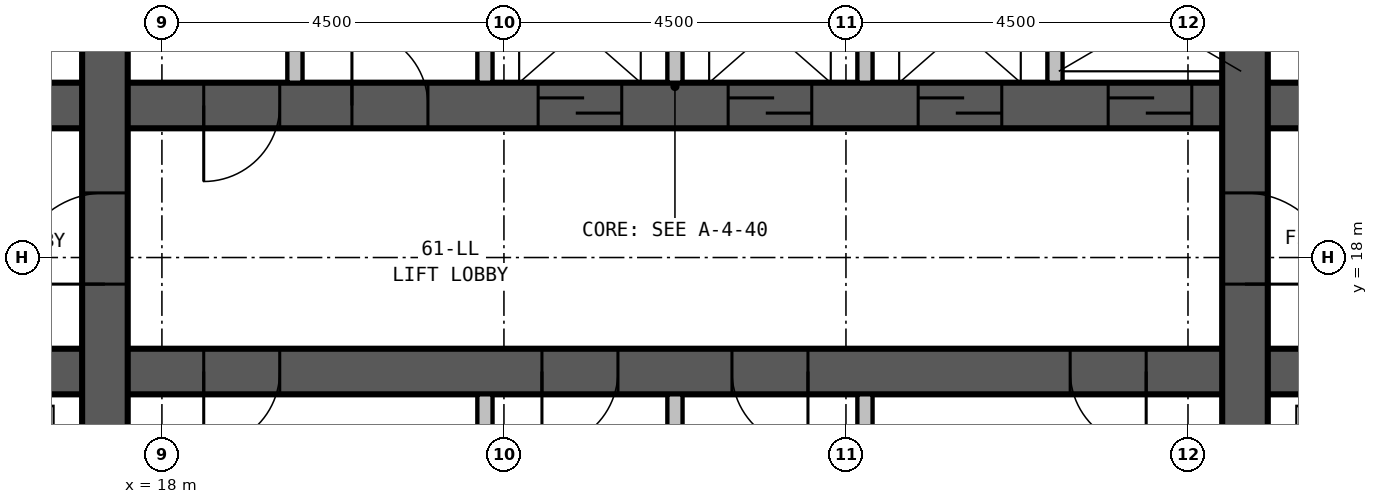
"""IFC4 building model, lengths in metres.
Left out: names, types, materials, properties, quantities, classifications, styles, units other than length and angle.
Written with IfcOpenShell. Run it as: python <this file> out.ifc"""

import sys

from ifc_helpers import new_model, si_unit, direction, frame, frame_2d, origin, place, context, subcontext, project, spatial, rectangle, extrude, element, fill, save


model = new_model("IFC4")
c1 = context("Model", 3, precision=1e-05, world=origin(), true_north=direction((0.0, 1.0)))
c2 = subcontext(c1, "Body", "Model", "MODEL_VIEW")
j1 = project(units=[si_unit("LENGTHUNIT", "METRE"), si_unit("PLANEANGLEUNIT", "RADIAN")], contexts=[c1])
p1 = place(None, origin())
s1 = spatial("IfcSite", under=j1, at=p1, CompositionType="ELEMENT")
p2 = place(p1, origin())
s2 = spatial("IfcBuilding", under=s1, at=p2, CompositionType="ELEMENT")
p3 = place(p2, frame((0.0, 0.0, 236.9)))
s3 = spatial("IfcBuildingStorey", under=s2, at=p3, CompositionType="ELEMENT", Elevation=236.9)
p4 = place(p3, frame((17.25, 13.8, 0.0), z_axis=(0.0, 0.0, 1.0), x_axis=(0.0, 1.0, 0.0)))
e1 = element("IfcWall", 1, at=p4, inside=s3, PredefinedType="SHEAR", context=c2, shape_type="SweptSolid", body=[
    extrude(rectangle(XDim=12.9, YDim=0.6, at=frame_2d((6.45, 0.0))), origin(), (0.0, 0.0, 1.0), 3.9),
])
p5 = place(p4, frame((3.85, 0.0, 0.0)))
e2 = element("IfcOpeningElement", 2, at=p5, cuts=e1, PredefinedType="OPENING", context=c2, shape_type="SweptSolid", body=[
    extrude(rectangle(XDim=1.2, YDim=2.1, at=frame_2d((0.6, 1.05))), frame((0.0, 0.31, 0.0), z_axis=(0.0, -1.0, 0.0), x_axis=(1.0, 0.0, 0.0)), (0.0, 0.0, 1.0), 0.62),
])
p6 = place(p3, frame((32.25, 13.8, 0.0), z_axis=(0.0, 0.0, 1.0), x_axis=(0.0, 1.0, 0.0)))
e3 = element("IfcWall", 3, at=p6, inside=s3, PredefinedType="SHEAR", context=c2, shape_type="SweptSolid", body=[
    extrude(rectangle(XDim=12.9, YDim=0.6, at=frame_2d((6.45, 0.0))), origin(), (0.0, 0.0, 1.0), 3.9),
])
p7 = place(p6, frame((5.05, 0.0, 0.0), z_axis=(0.0, 0.0, 1.0), x_axis=(-1.0, 0.0, 0.0)))
e4 = element("IfcOpeningElement", 4, at=p7, cuts=e3, PredefinedType="OPENING", context=c2, shape_type="SweptSolid", body=[
    extrude(rectangle(XDim=1.2, YDim=2.1, at=frame_2d((0.6, 1.05))), frame((0.0, 0.31, 0.0), z_axis=(0.0, -1.0, 0.0), x_axis=(1.0, 0.0, 0.0)), (0.0, 0.0, 1.0), 0.62),
])
p8 = place(p3, frame((13.8, 16.5, 0.0), z_axis=(0.0, 0.0, 1.0), x_axis=(1.0, 0.0, 0.0)))
e5 = element("IfcWall", 5, at=p8, inside=s3, PredefinedType="SHEAR", context=c2, shape_type="SweptSolid", body=[
    extrude(rectangle(XDim=21.9, YDim=0.6, at=frame_2d((10.95, 0.0))), origin(), (0.0, 0.0, 1.0), 3.9),
])
p9 = place(p8, frame((5.75, 0.0, 0.0), z_axis=(0.0, 0.0, 1.0), x_axis=(-1.0, 0.0, 0.0)))
e6 = element("IfcOpeningElement", 6, at=p9, cuts=e5, PredefinedType="OPENING", context=c2, shape_type="SweptSolid", body=[
    extrude(rectangle(XDim=1.0, YDim=2.1, at=frame_2d((0.5, 1.05))), frame((0.0, 0.31, 0.0), z_axis=(0.0, -1.0, 0.0), x_axis=(1.0, 0.0, 0.0)), (0.0, 0.0, 1.0), 0.62),
])
p10 = place(p8, frame((10.2, 0.0, 0.0), z_axis=(0.0, 0.0, 1.0), x_axis=(-1.0, 0.0, 0.0)))
e7 = element("IfcOpeningElement", 7, at=p10, cuts=e5, PredefinedType="OPENING", context=c2, shape_type="SweptSolid", body=[
    extrude(rectangle(XDim=1.0, YDim=2.1, at=frame_2d((0.5, 1.05))), frame((0.0, 0.31, 0.0), z_axis=(0.0, -1.0, 0.0), x_axis=(1.0, 0.0, 0.0)), (0.0, 0.0, 1.0), 0.62),
])
p11 = place(p8, frame((12.7, 0.0, 0.0), z_axis=(0.0, 0.0, 1.0), x_axis=(-1.0, 0.0, 0.0)))
e8 = element("IfcOpeningElement", 8, at=p11, cuts=e5, PredefinedType="OPENING", context=c2, shape_type="SweptSolid", body=[
    extrude(rectangle(XDim=1.0, YDim=2.1, at=frame_2d((0.5, 1.05))), frame((0.0, 0.31, 0.0), z_axis=(0.0, -1.0, 0.0), x_axis=(1.0, 0.0, 0.0)), (0.0, 0.0, 1.0), 0.62),
])
p12 = place(p8, frame((17.15, 0.0, 0.0), z_axis=(0.0, 0.0, 1.0), x_axis=(-1.0, 0.0, 0.0)))
e9 = element("IfcOpeningElement", 9, at=p12, cuts=e5, PredefinedType="OPENING", context=c2, shape_type="SweptSolid", body=[
    extrude(rectangle(XDim=1.0, YDim=2.1, at=frame_2d((0.5, 1.05))), frame((0.0, 0.31, 0.0), z_axis=(0.0, -1.0, 0.0), x_axis=(1.0, 0.0, 0.0)), (0.0, 0.0, 1.0), 0.62),
])
p13 = place(p8, frame((0.6, 0.0, 0.0)))
e10 = element("IfcOpeningElement", 10, at=p13, cuts=e5, PredefinedType="OPENING", context=c2, shape_type="SweptSolid", body=[
    extrude(rectangle(XDim=1.2, YDim=2.1, at=frame_2d((0.6, 1.05))), frame((0.0, 0.31, 0.0), z_axis=(0.0, -1.0, 0.0), x_axis=(1.0, 0.0, 0.0)), (0.0, 0.0, 1.0), 0.62),
])
p14 = place(p8, frame((19.6, 0.0, 0.0)))
e11 = element("IfcOpeningElement", 11, at=p14, cuts=e5, PredefinedType="OPENING", context=c2, shape_type="SweptSolid", body=[
    extrude(rectangle(XDim=1.2, YDim=2.1, at=frame_2d((0.6, 1.05))), frame((0.0, 0.31, 0.0), z_axis=(0.0, -1.0, 0.0), x_axis=(1.0, 0.0, 0.0)), (0.0, 0.0, 1.0), 0.62),
])
p15 = place(p3, frame((13.8, 20.0, 0.0), z_axis=(0.0, 0.0, 1.0), x_axis=(1.0, 0.0, 0.0)))
e12 = element("IfcWall", 12, at=p15, inside=s3, PredefinedType="SHEAR", context=c2, shape_type="SweptSolid", body=[
    extrude(rectangle(XDim=21.9, YDim=0.6, at=frame_2d((10.95, 0.0))), origin(), (0.0, 0.0, 1.0), 3.9),
])
p16 = place(p15, frame((0.5, 0.0, 0.0)))
e13 = element("IfcOpeningElement", 13, at=p16, cuts=e12, PredefinedType="OPENING", context=c2, shape_type="SweptSolid", body=[
    extrude(rectangle(XDim=1.0, YDim=2.1, at=frame_2d((0.5, 1.05))), frame((0.0, 0.31, 0.0), z_axis=(0.0, -1.0, 0.0), x_axis=(1.0, 0.0, 0.0)), (0.0, 0.0, 1.0), 0.62),
])
p17 = place(p15, frame((20.5, 0.0, 0.0)))
e14 = element("IfcOpeningElement", 14, at=p17, cuts=e12, PredefinedType="OPENING", context=c2, shape_type="SweptSolid", body=[
    extrude(rectangle(XDim=1.0, YDim=2.1, at=frame_2d((0.5, 1.05))), frame((0.0, 0.31, 0.0), z_axis=(0.0, -1.0, 0.0), x_axis=(1.0, 0.0, 0.0)), (0.0, 0.0, 1.0), 0.62),
])
p18 = place(p15, frame((9.15, 0.0, 0.0)))
e15 = element("IfcOpeningElement", 15, at=p18, cuts=e12, PredefinedType="OPENING", context=c2, shape_type="SweptSolid", body=[
    extrude(rectangle(XDim=1.1, YDim=2.1, at=frame_2d((0.55, 1.05))), frame((0.0, 0.31, 0.0), z_axis=(0.0, -1.0, 0.0), x_axis=(1.0, 0.0, 0.0)), (0.0, 0.0, 1.0), 0.62),
])
p19 = place(p15, frame((11.65, 0.0, 0.0)))
e16 = element("IfcOpeningElement", 16, at=p19, cuts=e12, PredefinedType="OPENING", context=c2, shape_type="SweptSolid", body=[
    extrude(rectangle(XDim=1.1, YDim=2.1, at=frame_2d((0.55, 1.05))), frame((0.0, 0.31, 0.0), z_axis=(0.0, -1.0, 0.0), x_axis=(1.0, 0.0, 0.0)), (0.0, 0.0, 1.0), 0.62),
])
p20 = place(p15, frame((14.15, 0.0, 0.0)))
e17 = element("IfcOpeningElement", 17, at=p20, cuts=e12, PredefinedType="OPENING", context=c2, shape_type="SweptSolid", body=[
    extrude(rectangle(XDim=1.1, YDim=2.1, at=frame_2d((0.55, 1.05))), frame((0.0, 0.31, 0.0), z_axis=(0.0, -1.0, 0.0), x_axis=(1.0, 0.0, 0.0)), (0.0, 0.0, 1.0), 0.62),
])
p21 = place(p15, frame((16.65, 0.0, 0.0)))
e18 = element("IfcOpeningElement", 18, at=p21, cuts=e12, PredefinedType="OPENING", context=c2, shape_type="SweptSolid", body=[
    extrude(rectangle(XDim=1.1, YDim=2.1, at=frame_2d((0.55, 1.05))), frame((0.0, 0.31, 0.0), z_axis=(0.0, -1.0, 0.0), x_axis=(1.0, 0.0, 0.0)), (0.0, 0.0, 1.0), 0.62),
])
p22 = place(p15, frame((5.75, 0.0, 0.0), z_axis=(0.0, 0.0, 1.0), x_axis=(-1.0, 0.0, 0.0)))
e19 = element("IfcOpeningElement", 19, at=p22, cuts=e12, PredefinedType="OPENING", context=c2, shape_type="SweptSolid", body=[
    extrude(rectangle(XDim=1.0, YDim=2.1, at=frame_2d((0.5, 1.05))), frame((0.0, 0.31, 0.0), z_axis=(0.0, -1.0, 0.0), x_axis=(1.0, 0.0, 0.0)), (0.0, 0.0, 1.0), 0.62),
])
p23 = place(p15, frame((6.7, 0.0, 0.0)))
e20 = element("IfcOpeningElement", 20, at=p23, cuts=e12, PredefinedType="OPENING", context=c2, shape_type="SweptSolid", body=[
    extrude(rectangle(XDim=1.0, YDim=2.1, at=frame_2d((0.5, 1.05))), frame((0.0, 0.31, 0.0), z_axis=(0.0, -1.0, 0.0), x_axis=(1.0, 0.0, 0.0)), (0.0, 0.0, 1.0), 0.62),
])
p24 = place(p3, frame((19.75, 20.3, 0.0), z_axis=(0.0, 0.0, 1.0), x_axis=(0.0, 1.0, 0.0)))
e21 = element("IfcWall", 21, at=p24, inside=s3, PredefinedType="PARTITIONING", context=c2, shape_type="SweptSolid", body=[
    extrude(rectangle(XDim=3.1, YDim=0.2, at=frame_2d((1.55, 0.0))), origin(), (0.0, 0.0, 1.0), 3.65),
])
p25 = place(p3, frame((22.25, 13.8, 0.0), z_axis=(0.0, 0.0, 1.0), x_axis=(0.0, 1.0, 0.0)))
e22 = element("IfcWall", 22, at=p25, inside=s3, PredefinedType="PARTITIONING", context=c2, shape_type="SweptSolid", body=[
    extrude(rectangle(XDim=2.4, YDim=0.2, at=frame_2d((1.2, 0.0))), origin(), (0.0, 0.0, 1.0), 3.65),
])
p26 = place(p3, frame((22.25, 20.3, 0.0), z_axis=(0.0, 0.0, 1.0), x_axis=(0.0, 1.0, 0.0)))
e23 = element("IfcWall", 23, at=p26, inside=s3, PredefinedType="PARTITIONING", context=c2, shape_type="SweptSolid", body=[
    extrude(rectangle(XDim=3.1, YDim=0.2, at=frame_2d((1.55, 0.0))), origin(), (0.0, 0.0, 1.0), 3.65),
])
p27 = place(p3, frame((24.75, 13.8, 0.0), z_axis=(0.0, 0.0, 1.0), x_axis=(0.0, 1.0, 0.0)))
e24 = element("IfcWall", 24, at=p27, inside=s3, PredefinedType="PARTITIONING", context=c2, shape_type="SweptSolid", body=[
    extrude(rectangle(XDim=2.4, YDim=0.2, at=frame_2d((1.2, 0.0))), origin(), (0.0, 0.0, 1.0), 3.65),
])
p28 = place(p3, frame((24.75, 20.3, 0.0), z_axis=(0.0, 0.0, 1.0), x_axis=(0.0, 1.0, 0.0)))
e25 = element("IfcWall", 25, at=p28, inside=s3, PredefinedType="PARTITIONING", context=c2, shape_type="SweptSolid", body=[
    extrude(rectangle(XDim=3.1, YDim=0.2, at=frame_2d((1.55, 0.0))), origin(), (0.0, 0.0, 1.0), 3.65),
])
p29 = place(p3, frame((27.25, 13.8, 0.0), z_axis=(0.0, 0.0, 1.0), x_axis=(0.0, 1.0, 0.0)))
e26 = element("IfcWall", 26, at=p29, inside=s3, PredefinedType="PARTITIONING", context=c2, shape_type="SweptSolid", body=[
    extrude(rectangle(XDim=2.4, YDim=0.2, at=frame_2d((1.2, 0.0))), origin(), (0.0, 0.0, 1.0), 3.65),
])
for number, where, z_axis, x_axis in (
    (27, (27.25, 20.3, 0.0), (0.0, 0.0, 1.0), (0.0, 1.0, 0.0)),
    (28, (29.75, 20.3, 0.0), (0.0, 0.0, 1.0), (0.0, 1.0, 0.0)),
):
    element("IfcWall", number, at=place(p3, frame(where, z_axis=z_axis, x_axis=x_axis)), inside=s3, PredefinedType="PARTITIONING", context=c2, shape_type="SweptSolid", body=[
        extrude(rectangle(XDim=3.1, YDim=0.2, at=frame_2d((1.55, 0.0))), origin(), (0.0, 0.0, 1.0), 3.65),
    ])
p30 = place(p5, origin())
e29 = element("IfcDoor", 29, at=p30, inside=s3, OperationType="SINGLE_SWING_LEFT", PredefinedType="DOOR", context=c2, shape_type="SweptSolid", body=[
    extrude(rectangle(XDim=1.2, YDim=2.1, at=frame_2d((0.6, 1.05))), frame((0.0, 0.3, 0.0), z_axis=(0.0, -1.0, 0.0), x_axis=(1.0, 0.0, 0.0)), (0.0, 0.0, 1.0), 0.6),
])
fill(e2, e29)
p31 = place(p7, origin())
e30 = element("IfcDoor", 30, at=p31, inside=s3, OperationType="SINGLE_SWING_RIGHT", PredefinedType="DOOR", context=c2, shape_type="SweptSolid", body=[
    extrude(rectangle(XDim=1.2, YDim=2.1, at=frame_2d((0.6, 1.05))), frame((0.0, 0.3, 0.0), z_axis=(0.0, -1.0, 0.0), x_axis=(1.0, 0.0, 0.0)), (0.0, 0.0, 1.0), 0.6),
])
fill(e4, e30)
p32 = place(p18, origin())
e31 = element("IfcDoor", 31, at=p32, inside=s3, OperationType="SLIDING_TO_LEFT", PredefinedType="DOOR", context=c2, shape_type="SweptSolid", body=[
    extrude(rectangle(XDim=1.1, YDim=2.1, at=frame_2d((0.55, 1.05))), frame((0.0, 0.3, 0.0), z_axis=(0.0, -1.0, 0.0), x_axis=(1.0, 0.0, 0.0)), (0.0, 0.0, 1.0), 0.6),
])
fill(e15, e31)
p33 = place(p19, origin())
e32 = element("IfcDoor", 32, at=p33, inside=s3, OperationType="SLIDING_TO_LEFT", PredefinedType="DOOR", context=c2, shape_type="SweptSolid", body=[
    extrude(rectangle(XDim=1.1, YDim=2.1, at=frame_2d((0.55, 1.05))), frame((0.0, 0.3, 0.0), z_axis=(0.0, -1.0, 0.0), x_axis=(1.0, 0.0, 0.0)), (0.0, 0.0, 1.0), 0.6),
])
fill(e16, e32)
p34 = place(p20, origin())
e33 = element("IfcDoor", 33, at=p34, inside=s3, OperationType="SLIDING_TO_LEFT", PredefinedType="DOOR", context=c2, shape_type="SweptSolid", body=[
    extrude(rectangle(XDim=1.1, YDim=2.1, at=frame_2d((0.55, 1.05))), frame((0.0, 0.3, 0.0), z_axis=(0.0, -1.0, 0.0), x_axis=(1.0, 0.0, 0.0)), (0.0, 0.0, 1.0), 0.6),
])
fill(e17, e33)
p35 = place(p21, origin())
e34 = element("IfcDoor", 34, at=p35, inside=s3, OperationType="SLIDING_TO_LEFT", PredefinedType="DOOR", context=c2, shape_type="SweptSolid", body=[
    extrude(rectangle(XDim=1.1, YDim=2.1, at=frame_2d((0.55, 1.05))), frame((0.0, 0.3, 0.0), z_axis=(0.0, -1.0, 0.0), x_axis=(1.0, 0.0, 0.0)), (0.0, 0.0, 1.0), 0.6),
])
fill(e18, e34)
p36 = place(p9, origin())
e35 = element("IfcDoor", 35, at=p36, inside=s3, OperationType="SINGLE_SWING_RIGHT", PredefinedType="DOOR", context=c2, shape_type="SweptSolid", body=[
    extrude(rectangle(XDim=1.0, YDim=2.1, at=frame_2d((0.5, 1.05))), frame((0.0, 0.3, 0.0), z_axis=(0.0, -1.0, 0.0), x_axis=(1.0, 0.0, 0.0)), (0.0, 0.0, 1.0), 0.6),
])
fill(e6, e35)
p37 = place(p10, origin())
e36 = element("IfcDoor", 36, at=p37, inside=s3, OperationType="SINGLE_SWING_RIGHT", PredefinedType="DOOR", context=c2, shape_type="SweptSolid", body=[
    extrude(rectangle(XDim=1.0, YDim=2.1, at=frame_2d((0.5, 1.05))), frame((0.0, 0.3, 0.0), z_axis=(0.0, -1.0, 0.0), x_axis=(1.0, 0.0, 0.0)), (0.0, 0.0, 1.0), 0.6),
])
fill(e7, e36)
p38 = place(p11, origin())
e37 = element("IfcDoor", 37, at=p38, inside=s3, OperationType="SINGLE_SWING_LEFT", PredefinedType="DOOR", context=c2, shape_type="SweptSolid", body=[
    extrude(rectangle(XDim=1.0, YDim=2.1, at=frame_2d((0.5, 1.05))), frame((0.0, 0.3, 0.0), z_axis=(0.0, -1.0, 0.0), x_axis=(1.0, 0.0, 0.0)), (0.0, 0.0, 1.0), 0.6),
])
fill(e8, e37)
p39 = place(p12, origin())
e38 = element("IfcDoor", 38, at=p39, inside=s3, OperationType="SINGLE_SWING_LEFT", PredefinedType="DOOR", context=c2, shape_type="SweptSolid", body=[
    extrude(rectangle(XDim=1.0, YDim=2.1, at=frame_2d((0.5, 1.05))), frame((0.0, 0.3, 0.0), z_axis=(0.0, -1.0, 0.0), x_axis=(1.0, 0.0, 0.0)), (0.0, 0.0, 1.0), 0.6),
])
fill(e9, e38)
p40 = place(p22, origin())
e39 = element("IfcDoor", 39, at=p40, inside=s3, OperationType="SINGLE_SWING_RIGHT", PredefinedType="DOOR", context=c2, shape_type="SweptSolid", body=[
    extrude(rectangle(XDim=1.0, YDim=2.1, at=frame_2d((0.5, 1.05))), frame((0.0, 0.3, 0.0), z_axis=(0.0, -1.0, 0.0), x_axis=(1.0, 0.0, 0.0)), (0.0, 0.0, 1.0), 0.6),
])
fill(e19, e39)
p41 = place(p23, origin())
e40 = element("IfcDoor", 40, at=p41, inside=s3, OperationType="SINGLE_SWING_LEFT", PredefinedType="DOOR", context=c2, shape_type="SweptSolid", body=[
    extrude(rectangle(XDim=1.0, YDim=2.1, at=frame_2d((0.5, 1.05))), frame((0.0, 0.3, 0.0), z_axis=(0.0, -1.0, 0.0), x_axis=(1.0, 0.0, 0.0)), (0.0, 0.0, 1.0), 0.6),
])
fill(e20, e40)
save(model, sys.argv[1])
